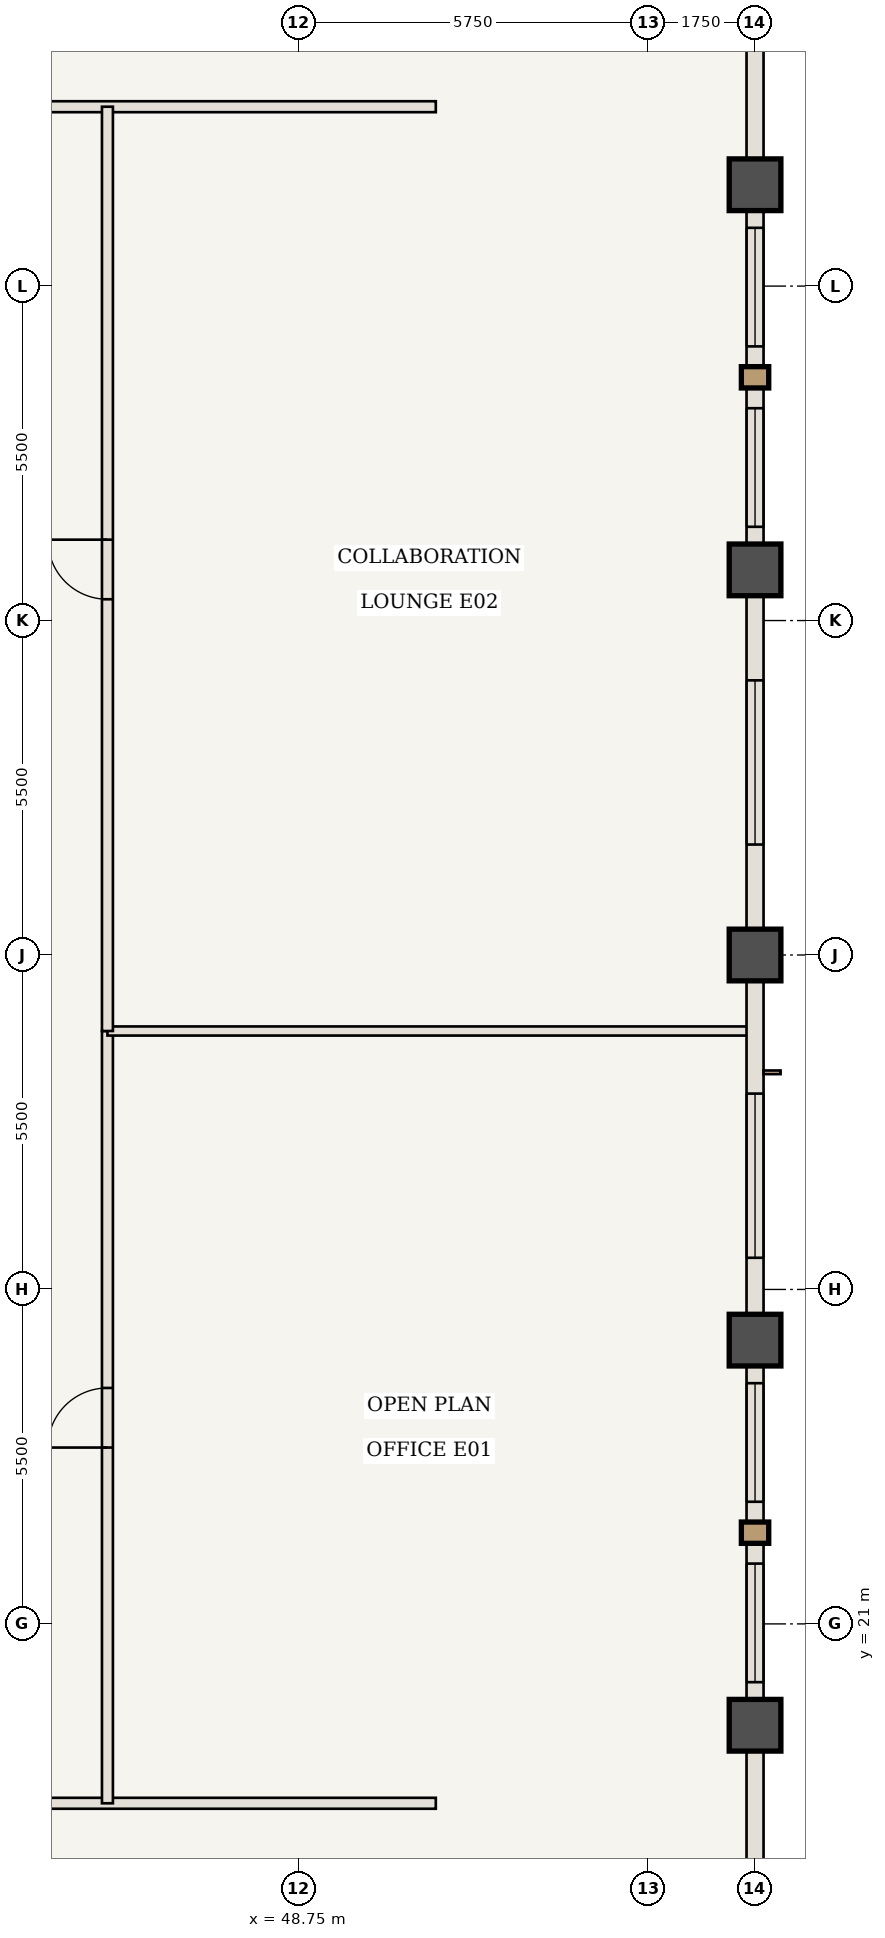
"""IFC4 building model, lengths in metres.
Left out: names, types, materials, properties, quantities, classifications, styles, units other than length and angle.
Written with IfcOpenShell. Run it as: python <this file> out.ifc"""

import sys

from ifc_helpers import new_model, si_unit, direction, frame, frame_2d, origin, origin_2d, place, context, subcontext, project, spatial, rectangle, extrude, element, fill, save


model = new_model("IFC4")
c1 = context("Model", 3, precision=1e-05, world=origin(), true_north=direction((0.0, 1.0)))
c2 = subcontext(c1, "Body", "Model", "MODEL_VIEW")
j1 = project(units=[si_unit("LENGTHUNIT", "METRE"), si_unit("PLANEANGLEUNIT", "RADIAN")], contexts=[c1])
p1 = place(None, origin())
s1 = spatial("IfcSite", under=j1, at=p1, CompositionType="ELEMENT")
p2 = place(p1, origin())
s2 = spatial("IfcBuilding", under=s1, at=p2, CompositionType="ELEMENT")
p3 = place(p2, frame((0.0, 0.0, 198.45)))
s3 = spatial("IfcBuildingStorey", under=s2, at=p3, CompositionType="ELEMENT", Elevation=198.45)
for number, where, z_axis, x_axis in (
    (1, (56.25, 19.333, 0.0), (0.0, 0.0, 1.0), (1.0, 0.0, 0.0)),
    (2, (56.25, 25.667, 0.0), (0.0, 0.0, 1.0), (1.0, 0.0, 0.0)),
    (3, (56.25, 32.0, 0.0), (0.0, 0.0, 1.0), (1.0, 0.0, 0.0)),
    (4, (56.25, 38.333, 0.0), (0.0, 0.0, 1.0), (1.0, 0.0, 0.0)),
    (5, (56.25, 44.667, 0.0), (0.0, 0.0, 1.0), (1.0, 0.0, 0.0)),
):
    element("IfcColumn", number, at=place(p3, frame(where, z_axis=z_axis, x_axis=x_axis)), inside=s3, PredefinedType="COLUMN", context=c2, shape_type="SweptSolid", body=[
        extrude(rectangle(XDim=0.85, YDim=0.85, at=origin_2d()), origin(), (0.0, 0.0, 1.0), 3.85),
    ])
p4 = place(p3, frame((39.208, 18.05, 0.0), z_axis=(0.0, 0.0, 1.0), x_axis=(1.0, 0.0, 0.0)))
e6 = element("IfcWall", 6, at=p4, inside=s3, PredefinedType="STANDARD", context=c2, shape_type="SweptSolid", body=[
    extrude(rectangle(XDim=11.792, YDim=0.18, at=frame_2d((5.896, 0.0))), origin(), (0.0, 0.0, 1.0), 3.685),
])
p5 = place(p4, frame((1.221, 0.0, 0.0)))
e7 = element("IfcOpeningElement", 7, at=p5, cuts=e6, PredefinedType="OPENING", context=c2, shape_type="SweptSolid", body=[
    extrude(rectangle(XDim=0.98, YDim=2.2, at=frame_2d((0.49, 1.1))), frame((0.0, 0.1, 0.0), z_axis=(0.0, -1.0, 0.0), x_axis=(1.0, 0.0, 0.0)), (0.0, 0.0, 1.0), 0.2),
])
p6 = place(p3, frame((39.558, 45.95, 0.0), z_axis=(0.0, 0.0, 1.0), x_axis=(1.0, 0.0, 0.0)))
e8 = element("IfcWall", 8, at=p6, inside=s3, PredefinedType="STANDARD", context=c2, shape_type="SweptSolid", body=[
    extrude(rectangle(XDim=11.442, YDim=0.18, at=frame_2d((5.721, 0.0))), origin(), (0.0, 0.0, 1.0), 3.685),
])
p7 = place(p6, frame((1.046, 0.0, 0.0)))
e9 = element("IfcOpeningElement", 9, at=p7, cuts=e8, PredefinedType="OPENING", context=c2, shape_type="SweptSolid", body=[
    extrude(rectangle(XDim=0.98, YDim=2.2, at=frame_2d((0.49, 1.1))), frame((0.0, 0.1, 0.0), z_axis=(0.0, -1.0, 0.0), x_axis=(1.0, 0.0, 0.0)), (0.0, 0.0, 1.0), 0.2),
])
p8 = place(p3, frame((45.6, 18.05, 0.0), z_axis=(0.0, 0.0, 1.0), x_axis=(0.0, 1.0, 0.0)))
e10 = element("IfcWall", 10, at=p8, inside=s3, PredefinedType="STANDARD", context=c2, shape_type="SweptSolid", body=[
    extrude(rectangle(XDim=12.7, YDim=0.18, at=frame_2d((6.35, 0.0))), origin(), (0.0, 0.0, 1.0), 3.685),
])
p9 = place(p8, frame((5.85, 0.0, 0.0)))
e11 = element("IfcOpeningElement", 11, at=p9, cuts=e10, PredefinedType="OPENING", context=c2, shape_type="SweptSolid", body=[
    extrude(rectangle(XDim=0.98, YDim=2.2, at=frame_2d((0.49, 1.1))), frame((0.0, 0.1, 0.0), z_axis=(0.0, -1.0, 0.0), x_axis=(1.0, 0.0, 0.0)), (0.0, 0.0, 1.0), 0.2),
])
p10 = place(p3, frame((45.6, 30.75, 0.0), z_axis=(0.0, 0.0, 1.0), x_axis=(1.0, 0.0, 0.0)))
e12 = element("IfcWall", 12, at=p10, inside=s3, PredefinedType="STANDARD", context=c2, shape_type="SweptSolid", body=[
    extrude(rectangle(XDim=10.59, YDim=0.15, at=frame_2d((5.295, 0.0))), origin(), (0.0, 0.0, 1.0), 3.685),
])
p11 = place(p3, frame((45.6, 30.75, 0.0), z_axis=(0.0, 0.0, 1.0), x_axis=(0.0, 1.0, 0.0)))
e13 = element("IfcWall", 13, at=p11, inside=s3, PredefinedType="STANDARD", context=c2, shape_type="SweptSolid", body=[
    extrude(rectangle(XDim=15.2, YDim=0.18, at=frame_2d((7.6, 0.0))), origin(), (0.0, 0.0, 1.0), 3.685),
])
p12 = place(p11, frame((7.1, 0.0, 0.0)))
e14 = element("IfcOpeningElement", 14, at=p12, cuts=e13, PredefinedType="OPENING", context=c2, shape_type="SweptSolid", body=[
    extrude(rectangle(XDim=0.98, YDim=2.2, at=frame_2d((0.49, 1.1))), frame((0.0, 0.1, 0.0), z_axis=(0.0, -1.0, 0.0), x_axis=(1.0, 0.0, 0.0)), (0.0, 0.0, 1.0), 0.2),
])
p13 = place(p3, frame((56.25, 19.333, 0.0), z_axis=(0.0, 0.0, 1.0), x_axis=(0.0, -1.0, 0.0)))
e15 = element("IfcWall", 15, at=p13, inside=s3, PredefinedType="USERDEFINED", context=c2, shape_type="SweptSolid", body=[
    extrude(rectangle(XDim=6.333, YDim=0.28, at=frame_2d((3.167, 0.0))), origin(), (0.0, 0.0, 1.0), 2.985),
])
p14 = place(p3, frame((56.25, 25.667, 0.0), z_axis=(0.0, 0.0, 1.0), x_axis=(0.0, -1.0, 0.0)))
e16 = element("IfcWall", 16, at=p14, inside=s3, PredefinedType="USERDEFINED", context=c2, shape_type="SweptSolid", body=[
    extrude(rectangle(XDim=6.333, YDim=0.28, at=frame_2d((3.167, 0.0))), origin(), (0.0, 0.0, 1.0), 2.985),
])
p15 = place(p14, frame((0.708, 0.0, 0.85)))
e17 = element("IfcOpeningElement", 17, at=p15, cuts=e16, PredefinedType="OPENING", context=c2, shape_type="SweptSolid", body=[
    extrude(rectangle(XDim=1.95, YDim=1.935, at=frame_2d((0.975, 0.968))), frame((0.0, 0.15, 0.0), z_axis=(0.0, -1.0, 0.0), x_axis=(1.0, 0.0, 0.0)), (0.0, 0.0, 1.0), 0.3),
])
p16 = place(p14, frame((3.675, 0.0, 0.85)))
e18 = element("IfcOpeningElement", 18, at=p16, cuts=e16, PredefinedType="OPENING", context=c2, shape_type="SweptSolid", body=[
    extrude(rectangle(XDim=1.95, YDim=1.935, at=frame_2d((0.975, 0.968))), frame((0.0, 0.15, 0.0), z_axis=(0.0, -1.0, 0.0), x_axis=(1.0, 0.0, 0.0)), (0.0, 0.0, 1.0), 0.3),
])
p17 = place(p3, frame((56.25, 32.0, 0.0), z_axis=(0.0, 0.0, 1.0), x_axis=(0.0, -1.0, 0.0)))
e19 = element("IfcWall", 19, at=p17, inside=s3, PredefinedType="USERDEFINED", context=c2, shape_type="SweptSolid", body=[
    extrude(rectangle(XDim=6.333, YDim=0.28, at=frame_2d((3.167, 0.0))), origin(), (0.0, 0.0, 1.0), 2.985),
])
p18 = place(p17, frame((2.279, 0.0, 0.85)))
e20 = element("IfcOpeningElement", 20, at=p18, cuts=e19, PredefinedType="OPENING", context=c2, shape_type="SweptSolid", body=[
    extrude(rectangle(XDim=2.7, YDim=1.935, at=frame_2d((1.35, 0.968))), frame((0.0, 0.15, 0.0), z_axis=(0.0, -1.0, 0.0), x_axis=(1.0, 0.0, 0.0)), (0.0, 0.0, 1.0), 0.3),
])
p19 = place(p3, frame((56.25, 38.333, 0.0), z_axis=(0.0, 0.0, 1.0), x_axis=(0.0, -1.0, 0.0)))
e21 = element("IfcWall", 21, at=p19, inside=s3, PredefinedType="USERDEFINED", context=c2, shape_type="SweptSolid", body=[
    extrude(rectangle(XDim=6.333, YDim=0.28, at=frame_2d((3.167, 0.0))), origin(), (0.0, 0.0, 1.0), 2.985),
])
p20 = place(p19, frame((1.817, 0.0, 0.85)))
e22 = element("IfcOpeningElement", 22, at=p20, cuts=e21, PredefinedType="OPENING", context=c2, shape_type="SweptSolid", body=[
    extrude(rectangle(XDim=2.7, YDim=1.935, at=frame_2d((1.35, 0.968))), frame((0.0, 0.15, 0.0), z_axis=(0.0, -1.0, 0.0), x_axis=(1.0, 0.0, 0.0)), (0.0, 0.0, 1.0), 0.3),
])
p21 = place(p3, frame((56.25, 44.667, 0.0), z_axis=(0.0, 0.0, 1.0), x_axis=(0.0, -1.0, 0.0)))
e23 = element("IfcWall", 23, at=p21, inside=s3, PredefinedType="USERDEFINED", context=c2, shape_type="SweptSolid", body=[
    extrude(rectangle(XDim=6.333, YDim=0.28, at=frame_2d((3.167, 0.0))), origin(), (0.0, 0.0, 1.0), 2.985),
])
p22 = place(p21, frame((0.708, 0.0, 0.85)))
e24 = element("IfcOpeningElement", 24, at=p22, cuts=e23, PredefinedType="OPENING", context=c2, shape_type="SweptSolid", body=[
    extrude(rectangle(XDim=1.95, YDim=1.935, at=frame_2d((0.975, 0.968))), frame((0.0, 0.15, 0.0), z_axis=(0.0, -1.0, 0.0), x_axis=(1.0, 0.0, 0.0)), (0.0, 0.0, 1.0), 0.3),
])
p23 = place(p21, frame((3.675, 0.0, 0.85)))
e25 = element("IfcOpeningElement", 25, at=p23, cuts=e23, PredefinedType="OPENING", context=c2, shape_type="SweptSolid", body=[
    extrude(rectangle(XDim=1.95, YDim=1.935, at=frame_2d((0.975, 0.968))), frame((0.0, 0.15, 0.0), z_axis=(0.0, -1.0, 0.0), x_axis=(1.0, 0.0, 0.0)), (0.0, 0.0, 1.0), 0.3),
])
p24 = place(p3, frame((56.25, 51.0, 0.0), z_axis=(0.0, 0.0, 1.0), x_axis=(0.0, -1.0, 0.0)))
e26 = element("IfcWall", 26, at=p24, inside=s3, PredefinedType="USERDEFINED", context=c2, shape_type="SweptSolid", body=[
    extrude(rectangle(XDim=6.333, YDim=0.28, at=frame_2d((3.167, 0.0))), origin(), (0.0, 0.0, 1.0), 2.985),
])
p25 = place(p9, origin())
e27 = element("IfcDoor", 27, at=p25, inside=s3, OperationType="SINGLE_SWING_LEFT", PredefinedType="DOOR", context=c2, shape_type="SweptSolid", body=[
    extrude(rectangle(XDim=0.98, YDim=2.2, at=frame_2d((0.49, 1.1))), frame((0.0, 0.025, 0.0), z_axis=(0.0, -1.0, 0.0), x_axis=(1.0, 0.0, 0.0)), (0.0, 0.0, 1.0), 0.05),
])
fill(e11, e27)
p26 = place(p12, origin())
e28 = element("IfcDoor", 28, at=p26, inside=s3, OperationType="SINGLE_SWING_RIGHT", PredefinedType="DOOR", context=c2, shape_type="SweptSolid", body=[
    extrude(rectangle(XDim=0.98, YDim=2.2, at=frame_2d((0.49, 1.1))), frame((0.0, 0.025, 0.0), z_axis=(0.0, -1.0, 0.0), x_axis=(1.0, 0.0, 0.0)), (0.0, 0.0, 1.0), 0.05),
])
fill(e14, e28)
p27 = place(p15, origin())
e29 = element("IfcWindow", 29, at=p27, inside=s3, PartitioningType="SINGLE_PANEL", PredefinedType="WINDOW", context=c2, shape_type="SweptSolid", body=[
    extrude(rectangle(XDim=1.95, YDim=1.935, at=frame_2d((0.975, 0.968))), frame((0.0, 0.03, 0.0), z_axis=(0.0, -1.0, 0.0), x_axis=(1.0, 0.0, 0.0)), (0.0, 0.0, 1.0), 0.06),
])
fill(e17, e29)
p28 = place(p16, origin())
e30 = element("IfcWindow", 30, at=p28, inside=s3, PartitioningType="SINGLE_PANEL", PredefinedType="WINDOW", context=c2, shape_type="SweptSolid", body=[
    extrude(rectangle(XDim=1.95, YDim=1.935, at=frame_2d((0.975, 0.968))), frame((0.0, 0.03, 0.0), z_axis=(0.0, -1.0, 0.0), x_axis=(1.0, 0.0, 0.0)), (0.0, 0.0, 1.0), 0.06),
])
fill(e18, e30)
p29 = place(p18, origin())
e31 = element("IfcWindow", 31, at=p29, inside=s3, PartitioningType="SINGLE_PANEL", PredefinedType="WINDOW", context=c2, shape_type="SweptSolid", body=[
    extrude(rectangle(XDim=2.7, YDim=1.935, at=frame_2d((1.35, 0.968))), frame((0.0, 0.03, 0.0), z_axis=(0.0, -1.0, 0.0), x_axis=(1.0, 0.0, 0.0)), (0.0, 0.0, 1.0), 0.06),
])
fill(e20, e31)
p30 = place(p20, origin())
e32 = element("IfcWindow", 32, at=p30, inside=s3, PartitioningType="SINGLE_PANEL", PredefinedType="WINDOW", context=c2, shape_type="SweptSolid", body=[
    extrude(rectangle(XDim=2.7, YDim=1.935, at=frame_2d((1.35, 0.968))), frame((0.0, 0.03, 0.0), z_axis=(0.0, -1.0, 0.0), x_axis=(1.0, 0.0, 0.0)), (0.0, 0.0, 1.0), 0.06),
])
fill(e22, e32)
p31 = place(p22, origin())
e33 = element("IfcWindow", 33, at=p31, inside=s3, PartitioningType="SINGLE_PANEL", PredefinedType="WINDOW", context=c2, shape_type="SweptSolid", body=[
    extrude(rectangle(XDim=1.95, YDim=1.935, at=frame_2d((0.975, 0.968))), frame((0.0, 0.03, 0.0), z_axis=(0.0, -1.0, 0.0), x_axis=(1.0, 0.0, 0.0)), (0.0, 0.0, 1.0), 0.06),
])
fill(e24, e33)
p32 = place(p23, origin())
e34 = element("IfcWindow", 34, at=p32, inside=s3, PartitioningType="SINGLE_PANEL", PredefinedType="WINDOW", context=c2, shape_type="SweptSolid", body=[
    extrude(rectangle(XDim=1.95, YDim=1.935, at=frame_2d((0.975, 0.968))), frame((0.0, 0.03, 0.0), z_axis=(0.0, -1.0, 0.0), x_axis=(1.0, 0.0, 0.0)), (0.0, 0.0, 1.0), 0.06),
])
fill(e25, e34)
save(model, sys.argv[1])
